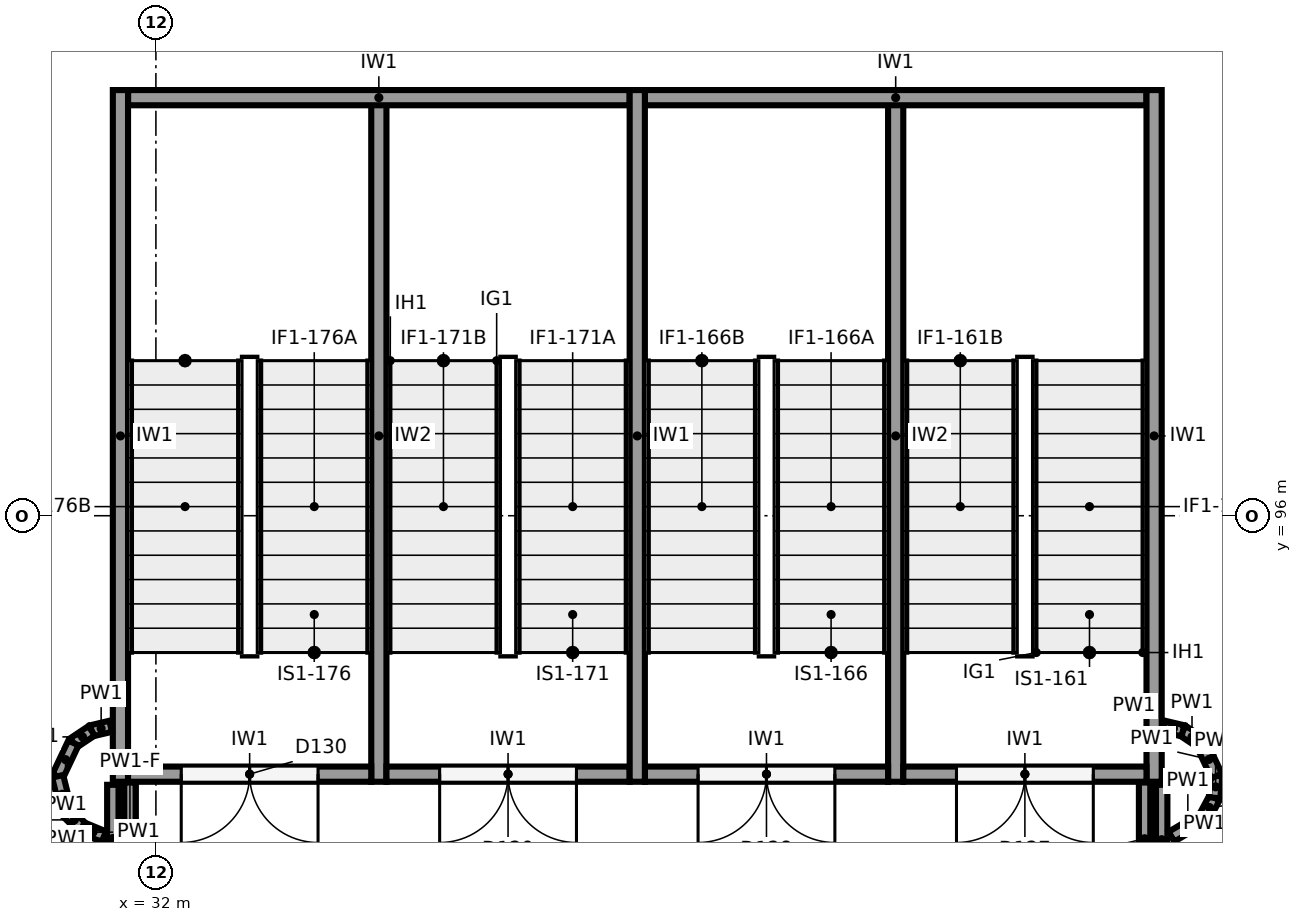
"""IFC4 building model, lengths in metres.
Left out: names, types, materials, properties, quantities, classifications, styles, units other than length and angle.
Written with IfcOpenShell. Run it as: python <this file> out.ifc"""

import sys

from ifc_helpers import new_model, si_unit, direction, frame, frame_2d, origin, place, context, subcontext, project, spatial, rectangle, extrude, element, fill, save


model = new_model("IFC4")
c1 = context("Model", 3, precision=1e-05, world=origin(), true_north=direction((0.0, 1.0)))
c2 = subcontext(c1, "Body", "Model", "MODEL_VIEW")
j1 = project(units=[si_unit("LENGTHUNIT", "METRE"), si_unit("PLANEANGLEUNIT", "RADIAN")], contexts=[c1])
p1 = place(None, origin())
s1 = spatial("IfcSite", under=j1, at=p1, CompositionType="ELEMENT")
p2 = place(p1, origin())
s2 = spatial("IfcBuilding", under=s1, at=p2, CompositionType="ELEMENT")
p3 = place(p2, frame((0.0, 0.0, -4.0)))
s3 = spatial("IfcBuildingStorey", under=s2, at=p3, CompositionType="ELEMENT", Elevation=-4.0)
for number, where, z_axis, x_axis in (
    (1, (45.133, 101.6, -1.2), (0.0, 0.0, 1.0), (0.0, -1.0, 0.0)),
    (2, (38.333, 101.6, -1.2), (0.0, 0.0, 1.0), (0.0, -1.0, 0.0)),
    (3, (31.533, 101.6, -1.2), (0.0, 0.0, 1.0), (0.0, -1.0, 0.0)),
):
    element("IfcWall", number, at=place(p3, frame(where, z_axis=z_axis, x_axis=x_axis)), inside=s3, PredefinedType="SHEAR", context=c2, shape_type="SweptSolid", body=[
        extrude(rectangle(XDim=9.1, YDim=0.2, at=frame_2d((4.55, 0.0))), origin(), (0.0, 0.0, 1.0), 4.8),
    ])
p4 = place(p3, frame((45.033, 101.5, -1.2), z_axis=(0.0, 0.0, 1.0), x_axis=(-1.0, 0.0, 0.0)))
e4 = element("IfcWall", 4, at=p4, inside=s3, PredefinedType="SHEAR", context=c2, shape_type="SweptSolid", body=[
    extrude(rectangle(XDim=6.6, YDim=0.2, at=frame_2d((3.3, 0.0))), origin(), (0.0, 0.0, 1.0), 4.8),
])
p5 = place(p3, frame((38.233, 101.5, -1.2), z_axis=(0.0, 0.0, 1.0), x_axis=(-1.0, 0.0, 0.0)))
e5 = element("IfcWall", 5, at=p5, inside=s3, PredefinedType="SHEAR", context=c2, shape_type="SweptSolid", body=[
    extrude(rectangle(XDim=6.6, YDim=0.2, at=frame_2d((3.3, 0.0))), origin(), (0.0, 0.0, 1.0), 4.8),
])
for number, where, z_axis, x_axis in (
    (6, (41.733, 101.6, -1.2), (0.0, 0.0, 1.0), (0.0, -1.0, 0.0)),
    (7, (34.933, 101.6, -1.2), (0.0, 0.0, 1.0), (0.0, -1.0, 0.0)),
):
    element("IfcWall", number, at=place(p3, frame(where, z_axis=z_axis, x_axis=x_axis)), inside=s3, PredefinedType="SHEAR", context=c2, shape_type="SweptSolid", body=[
        extrude(rectangle(XDim=9.1, YDim=0.2, at=frame_2d((4.55, 0.0))), origin(), (0.0, 0.0, 1.0), 4.8),
    ])
p6 = place(p3, frame((45.033, 92.6, -1.2), z_axis=(0.0, 0.0, 1.0), x_axis=(-1.0, 0.0, 0.0)))
e8 = element("IfcWall", 8, at=p6, inside=s3, PredefinedType="SHEAR", context=c2, shape_type="SweptSolid", body=[
    extrude(rectangle(XDim=3.2, YDim=0.2, at=frame_2d((1.6, 0.0))), origin(), (0.0, 0.0, 1.0), 4.8),
])
p7 = place(p6, frame((0.7, 0.0, 1.2)))
e9 = element("IfcOpeningElement", 9, at=p7, cuts=e8, PredefinedType="OPENING", context=c2, shape_type="SweptSolid", body=[
    extrude(rectangle(XDim=1.8, YDim=2.1, at=frame_2d((0.9, 1.05))), frame((0.0, 0.11, 0.0), z_axis=(0.0, -1.0, 0.0), x_axis=(1.0, 0.0, 0.0)), (0.0, 0.0, 1.0), 0.22),
])
p8 = place(p3, frame((41.633, 92.6, -1.2), z_axis=(0.0, 0.0, 1.0), x_axis=(-1.0, 0.0, 0.0)))
e10 = element("IfcWall", 10, at=p8, inside=s3, PredefinedType="SHEAR", context=c2, shape_type="SweptSolid", body=[
    extrude(rectangle(XDim=3.2, YDim=0.2, at=frame_2d((1.6, 0.0))), origin(), (0.0, 0.0, 1.0), 4.8),
])
p9 = place(p8, frame((0.7, 0.0, 1.2)))
e11 = element("IfcOpeningElement", 11, at=p9, cuts=e10, PredefinedType="OPENING", context=c2, shape_type="SweptSolid", body=[
    extrude(rectangle(XDim=1.8, YDim=2.1, at=frame_2d((0.9, 1.05))), frame((0.0, 0.11, 0.0), z_axis=(0.0, -1.0, 0.0), x_axis=(1.0, 0.0, 0.0)), (0.0, 0.0, 1.0), 0.22),
])
p10 = place(p3, frame((38.233, 92.6, -1.2), z_axis=(0.0, 0.0, 1.0), x_axis=(-1.0, 0.0, 0.0)))
e12 = element("IfcWall", 12, at=p10, inside=s3, PredefinedType="SHEAR", context=c2, shape_type="SweptSolid", body=[
    extrude(rectangle(XDim=3.2, YDim=0.2, at=frame_2d((1.6, 0.0))), origin(), (0.0, 0.0, 1.0), 4.8),
])
p11 = place(p10, frame((0.7, 0.0, 1.2)))
e13 = element("IfcOpeningElement", 13, at=p11, cuts=e12, PredefinedType="OPENING", context=c2, shape_type="SweptSolid", body=[
    extrude(rectangle(XDim=1.8, YDim=2.1, at=frame_2d((0.9, 1.05))), frame((0.0, 0.11, 0.0), z_axis=(0.0, -1.0, 0.0), x_axis=(1.0, 0.0, 0.0)), (0.0, 0.0, 1.0), 0.22),
])
p12 = place(p3, frame((34.833, 92.6, -1.2), z_axis=(0.0, 0.0, 1.0), x_axis=(-1.0, 0.0, 0.0)))
e14 = element("IfcWall", 14, at=p12, inside=s3, PredefinedType="SHEAR", context=c2, shape_type="SweptSolid", body=[
    extrude(rectangle(XDim=3.2, YDim=0.2, at=frame_2d((1.6, 0.0))), origin(), (0.0, 0.0, 1.0), 4.8),
])
p13 = place(p12, frame((0.7, 0.0, 1.2)))
e15 = element("IfcOpeningElement", 15, at=p13, cuts=e14, PredefinedType="OPENING", context=c2, shape_type="SweptSolid", body=[
    extrude(rectangle(XDim=1.8, YDim=2.1, at=frame_2d((0.9, 1.05))), frame((0.0, 0.11, 0.0), z_axis=(0.0, -1.0, 0.0), x_axis=(1.0, 0.0, 0.0)), (0.0, 0.0, 1.0), 0.22),
])
p14 = place(p3, frame((45.233, 91.016, 0.0), z_axis=(0.0, 0.0, 1.0), x_axis=(0.0, 1.0, 0.0)))
e16 = element("IfcWall", 16, at=p14, inside=s3, PredefinedType="PARTITIONING", context=c2, shape_type="SweptSolid", body=[
    extrude(rectangle(XDim=1.444, YDim=0.15, at=frame_2d((0.722, 0.0))), origin(), (0.0, 0.0, 1.0), 3.6),
])
p15 = place(p3, frame((31.433, 92.46, 0.0), z_axis=(0.0, 0.0, 1.0), x_axis=(0.0, -1.0, 0.0)))
e17 = element("IfcWall", 17, at=p15, inside=s3, PredefinedType="PARTITIONING", context=c2, shape_type="SweptSolid", body=[
    extrude(rectangle(XDim=1.413, YDim=0.15, at=frame_2d((0.706, 0.0))), origin(), (0.0, 0.0, 1.0), 3.6),
])
p16 = place(p3, frame((45.008, 91.011, 0.0), z_axis=(0.0, 0.0, 1.0), x_axis=(0.0, 1.0, 0.0)))
e18 = element("IfcWall", 18, at=p16, inside=s3, PredefinedType="PARTITIONING", context=c2, shape_type="SweptSolid", body=[
    extrude(rectangle(XDim=1.479, YDim=0.15, at=frame_2d((0.74, 0.0))), origin(), (0.0, 0.0, 1.0), 3.6),
])
p17 = place(p3, frame((31.658, 92.49, 0.0), z_axis=(0.0, 0.0, 1.0), x_axis=(0.0, -1.0, 0.0)))
e19 = element("IfcWall", 19, at=p17, inside=s3, PredefinedType="PARTITIONING", context=c2, shape_type="SweptSolid", body=[
    extrude(rectangle(XDim=2.43, YDim=0.15, at=frame_2d((1.215, 0.0))), origin(), (0.0, 0.0, 1.0), 2.5),
])
p18 = place(p3, frame((31.658, 92.49, 2.5), z_axis=(0.0, 0.0, 1.0), x_axis=(0.0, -1.0, 0.0)))
e20 = element("IfcWall", 20, at=p18, inside=s3, PredefinedType="PARTITIONING", context=c2, shape_type="SweptSolid", body=[
    extrude(rectangle(XDim=1.458, YDim=0.15, at=frame_2d((0.729, 0.0))), origin(), (0.0, 0.0, 1.0), 1.1),
])
p19 = place(p3, frame((45.362, 91.777, 0.0), z_axis=(0.0, 0.0, 1.0), x_axis=(0.85856712863, 0.512701166017, 0.0)))
e21 = element("IfcWall", 21, at=p19, inside=s3, PredefinedType="PARTITIONING", context=c2, shape_type="SweptSolid", body=[
    extrude(rectangle(XDim=0.5, YDim=0.15, at=frame_2d((0.25, 0.0))), origin(), (0.0, 0.0, 1.0), 3.6),
])
p20 = place(p3, frame((45.792, 92.034, 0.0), z_axis=(0.0, 0.0, 1.0), x_axis=(0.471682765858, 0.881768319, 0.0)))
e22 = element("IfcWall", 22, at=p20, inside=s3, PredefinedType="PARTITIONING", context=c2, shape_type="SweptSolid", body=[
    extrude(rectangle(XDim=0.289, YDim=0.15, at=frame_2d((0.145, 0.0))), origin(), (0.0, 0.0, 1.0), 3.6),
])
p21 = place(p3, frame((45.928, 92.289, 0.0), z_axis=(0.0, 0.0, 1.0), x_axis=(0.0978334953, 0.99520279702, 0.0)))
e23 = element("IfcWall", 23, at=p21, inside=s3, PredefinedType="PARTITIONING", context=c2, shape_type="SweptSolid", body=[
    extrude(rectangle(XDim=0.29, YDim=0.15, at=frame_2d((0.145, 0.0))), origin(), (0.0, 0.0, 1.0), 3.6),
])
p22 = place(p3, frame((45.957, 92.577, 0.0), z_axis=(0.0, 0.0, 1.0), x_axis=(-0.427757963167, 0.903893315025, 0.0)))
e24 = element("IfcWall", 24, at=p22, inside=s3, PredefinedType="PARTITIONING", context=c2, shape_type="SweptSolid", body=[
    extrude(rectangle(XDim=0.479, YDim=0.15, at=frame_2d((0.24, 0.0))), origin(), (0.0, 0.0, 1.0), 3.6),
])
p23 = place(p3, frame((45.752, 93.01, 0.0), z_axis=(0.0, 0.0, 1.0), x_axis=(-0.831397130511, 0.555678694372, 0.0)))
e25 = element("IfcWall", 25, at=p23, inside=s3, PredefinedType="PARTITIONING", context=c2, shape_type="SweptSolid", body=[
    extrude(rectangle(XDim=0.288, YDim=0.15, at=frame_2d((0.144, 0.0))), origin(), (0.0, 0.0, 1.0), 3.6),
])
for number, where, z_axis, x_axis in (
    (26, (45.512, 93.17, 0.0), (0.0, 0.0, 1.0), (-0.973, 0.23, 0.0)),
    (27, (31.405, 93.23, 0.0), (0.0, 0.0, 1.0), (-0.973, -0.23, 0.0)),
):
    element("IfcWall", number, at=place(p3, frame(where, z_axis=z_axis, x_axis=x_axis)), inside=s3, PredefinedType="PARTITIONING", context=c2, shape_type="SweptSolid", body=[
        extrude(rectangle(XDim=0.258, YDim=0.15, at=frame_2d((0.129, 0.0))), origin(), (0.0, 0.0, 1.0), 3.6),
    ])
p24 = place(p3, frame((31.154, 93.17, 0.0), z_axis=(0.0, 0.0, 1.0), x_axis=(-0.831397130511, -0.555678694372, 0.0)))
e28 = element("IfcWall", 28, at=p24, inside=s3, PredefinedType="PARTITIONING", context=c2, shape_type="SweptSolid", body=[
    extrude(rectangle(XDim=0.288, YDim=0.15, at=frame_2d((0.144, 0.0))), origin(), (0.0, 0.0, 1.0), 3.6),
])
for number, where, z_axis, x_axis in (
    (29, (30.915, 93.01, 0.0), (0.0, 0.0, 1.0), (-0.428, -0.904, 0.0)),
    (30, (30.707, 92.572, 0.0), (0.0, 0.0, 1.0), (0.243, -0.97, 0.0)),
):
    element("IfcWall", number, at=place(p3, frame(where, z_axis=z_axis, x_axis=x_axis)), inside=s3, PredefinedType="PARTITIONING", context=c2, shape_type="SweptSolid", body=[
        extrude(rectangle(XDim=0.486, YDim=0.15, at=frame_2d((0.243, 0.0))), origin(), (0.0, 0.0, 1.0), 3.6),
    ])
p25 = place(p3, frame((30.825, 92.101, 0.0), z_axis=(0.0, 0.0, 1.0), x_axis=(0.707106781187, -0.707106781187, 0.0)))
e31 = element("IfcWall", 31, at=p25, inside=s3, PredefinedType="PARTITIONING", context=c2, shape_type="SweptSolid", body=[
    extrude(rectangle(XDim=0.289, YDim=0.15, at=frame_2d((0.145, 0.0))), origin(), (0.0, 0.0, 1.0), 3.6),
])
p26 = place(p3, frame((31.03, 91.896, 0.0), z_axis=(0.0, 0.0, 1.0), x_axis=(0.923707957869, -0.383097387839, 0.0)))
e32 = element("IfcWall", 32, at=p26, inside=s3, PredefinedType="PARTITIONING", context=c2, shape_type="SweptSolid", body=[
    extrude(rectangle(XDim=0.308, YDim=0.15, at=frame_2d((0.154, 0.0))), origin(), (0.0, 0.0, 1.0), 3.6),
])
p27 = place(p7, origin())
e33 = element("IfcDoor", 33, at=p27, inside=s3, OperationType="DOUBLE_DOOR_SINGLE_SWING", PredefinedType="DOOR", context=c2, shape_type="SweptSolid", body=[
    extrude(rectangle(XDim=1.8, YDim=2.1, at=frame_2d((0.9, 1.05))), frame((0.0, 0.025, 0.0), z_axis=(0.0, -1.0, 0.0), x_axis=(1.0, 0.0, 0.0)), (0.0, 0.0, 1.0), 0.05),
])
fill(e9, e33)
p28 = place(p9, origin())
e34 = element("IfcDoor", 34, at=p28, inside=s3, OperationType="DOUBLE_DOOR_SINGLE_SWING", PredefinedType="DOOR", context=c2, shape_type="SweptSolid", body=[
    extrude(rectangle(XDim=1.8, YDim=2.1, at=frame_2d((0.9, 1.05))), frame((0.0, 0.025, 0.0), z_axis=(0.0, -1.0, 0.0), x_axis=(1.0, 0.0, 0.0)), (0.0, 0.0, 1.0), 0.05),
])
fill(e11, e34)
p29 = place(p11, origin())
e35 = element("IfcDoor", 35, at=p29, inside=s3, OperationType="DOUBLE_DOOR_SINGLE_SWING", PredefinedType="DOOR", context=c2, shape_type="SweptSolid", body=[
    extrude(rectangle(XDim=1.8, YDim=2.1, at=frame_2d((0.9, 1.05))), frame((0.0, 0.025, 0.0), z_axis=(0.0, -1.0, 0.0), x_axis=(1.0, 0.0, 0.0)), (0.0, 0.0, 1.0), 0.05),
])
fill(e13, e35)
p30 = place(p13, origin())
e36 = element("IfcDoor", 36, at=p30, inside=s3, OperationType="DOUBLE_DOOR_SINGLE_SWING", PredefinedType="DOOR", context=c2, shape_type="SweptSolid", body=[
    extrude(rectangle(XDim=1.8, YDim=2.1, at=frame_2d((0.9, 1.05))), frame((0.0, 0.025, 0.0), z_axis=(0.0, -1.0, 0.0), x_axis=(1.0, 0.0, 0.0)), (0.0, 0.0, 1.0), 0.05),
])
fill(e15, e36)
save(model, sys.argv[1])
